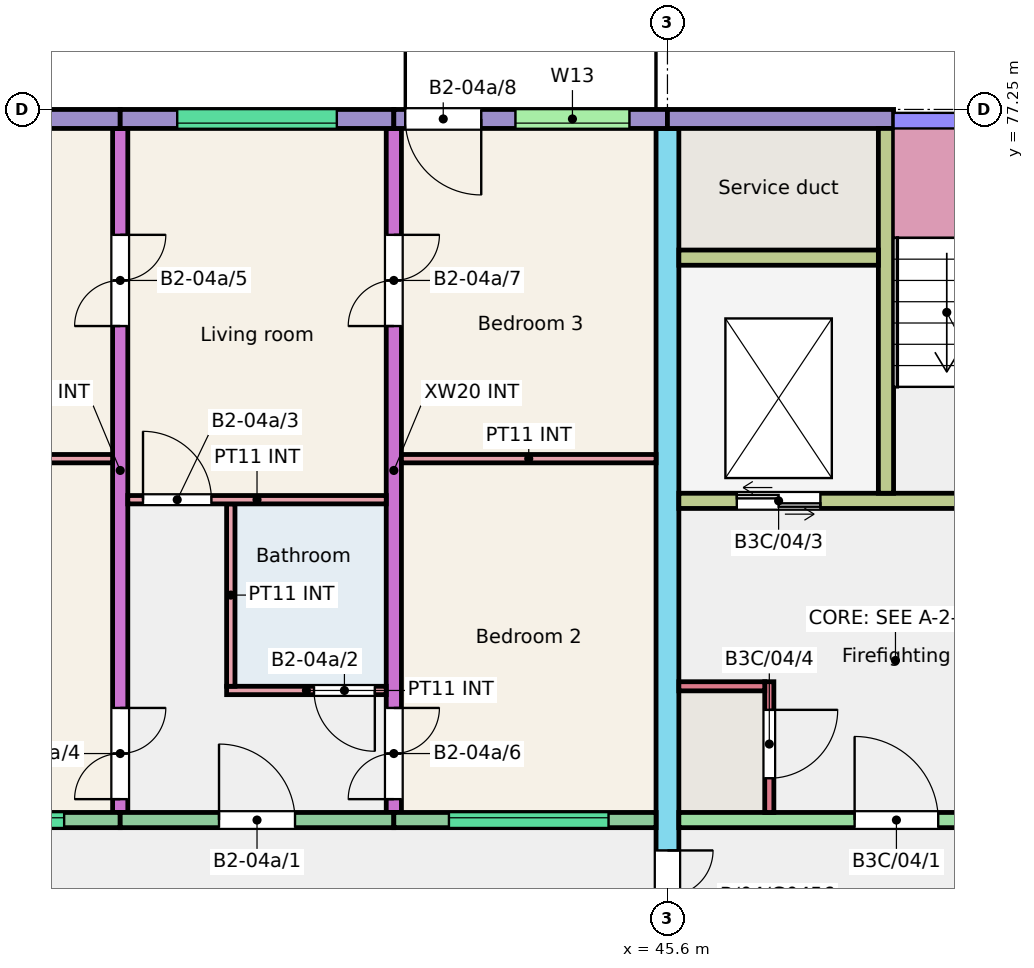
"""IFC4 building model, lengths in metres.
Left out: names, types, materials, properties, quantities, classifications, styles, units other than length and angle.
Written with IfcOpenShell. Run it as: python <this file> out.ifc"""

import sys

from ifc_helpers import new_model, si_unit, direction, frame, frame_2d, origin, place, context, subcontext, project, spatial, rectangle, extrude, element, fill, save


model = new_model("IFC4")
c1 = context("Model", 3, precision=1e-05, world=origin(), true_north=direction((0.0, 1.0)))
c2 = subcontext(c1, "Body", "Model", "MODEL_VIEW")
j1 = project(units=[si_unit("LENGTHUNIT", "METRE"), si_unit("PLANEANGLEUNIT", "RADIAN")], contexts=[c1])
p1 = place(None, origin())
s1 = spatial("IfcSite", under=j1, at=p1, CompositionType="ELEMENT")
p2 = place(p1, origin())
s2 = spatial("IfcBuilding", under=s1, at=p2, CompositionType="ELEMENT")
p3 = place(p2, frame((0.0, 0.0, 12.0)))
s3 = spatial("IfcBuildingStorey", under=s2, at=p3, CompositionType="ELEMENT", Elevation=12.0)
p4 = place(p3, frame((38.4, 68.0, 0.0), z_axis=(0.0, 0.0, 1.0), x_axis=(0.0, 1.0, 0.0)))
e1 = element("IfcWall", 1, at=p4, inside=s3, PredefinedType="SHEAR", context=c2, shape_type="SweptSolid", body=[
    extrude(rectangle(XDim=9.0, YDim=0.2, at=frame_2d((4.5, 0.0))), origin(), (0.0, 0.0, 1.0), 3.0),
])
p5 = place(p4, frame((0.175, 0.0, 0.0)))
e2 = element("IfcOpeningElement", 2, at=p5, cuts=e1, PredefinedType="OPENING", context=c2, shape_type="SweptSolid", body=[
    extrude(rectangle(XDim=1.2, YDim=2.1, at=frame_2d((0.6, 1.05))), frame((0.0, 0.11, 0.0), z_axis=(0.0, -1.0, 0.0), x_axis=(1.0, 0.0, 0.0)), (0.0, 0.0, 1.0), 0.22),
])
p6 = place(p4, frame((6.4, 0.0, 0.0)))
e3 = element("IfcOpeningElement", 3, at=p6, cuts=e1, PredefinedType="OPENING", context=c2, shape_type="SweptSolid", body=[
    extrude(rectangle(XDim=1.2, YDim=2.1, at=frame_2d((0.6, 1.05))), frame((0.0, 0.11, 0.0), z_axis=(0.0, -1.0, 0.0), x_axis=(1.0, 0.0, 0.0)), (0.0, 0.0, 1.0), 0.22),
])
p7 = place(p3, frame((42.0, 68.0, 0.0), z_axis=(0.0, 0.0, 1.0), x_axis=(0.0, 1.0, 0.0)))
e4 = element("IfcWall", 4, at=p7, inside=s3, PredefinedType="SHEAR", context=c2, shape_type="SweptSolid", body=[
    extrude(rectangle(XDim=9.0, YDim=0.2, at=frame_2d((4.5, 0.0))), origin(), (0.0, 0.0, 1.0), 3.0),
])
p8 = place(p7, frame((0.175, 0.0, 0.0)))
e5 = element("IfcOpeningElement", 5, at=p8, cuts=e4, PredefinedType="OPENING", context=c2, shape_type="SweptSolid", body=[
    extrude(rectangle(XDim=1.2, YDim=2.1, at=frame_2d((0.6, 1.05))), frame((0.0, 0.11, 0.0), z_axis=(0.0, -1.0, 0.0), x_axis=(1.0, 0.0, 0.0)), (0.0, 0.0, 1.0), 0.22),
])
p9 = place(p7, frame((6.4, 0.0, 0.0)))
e6 = element("IfcOpeningElement", 6, at=p9, cuts=e4, PredefinedType="OPENING", context=c2, shape_type="SweptSolid", body=[
    extrude(rectangle(XDim=1.2, YDim=2.1, at=frame_2d((0.6, 1.05))), frame((0.0, 0.11, 0.0), z_axis=(0.0, -1.0, 0.0), x_axis=(1.0, 0.0, 0.0)), (0.0, 0.0, 1.0), 0.22),
])
p10 = place(p3, frame((45.6, 66.0, 0.0), z_axis=(0.0, 0.0, 1.0), x_axis=(0.0, 1.0, 0.0)))
e7 = element("IfcWall", 7, at=p10, inside=s3, PredefinedType="SHEAR", context=c2, shape_type="SweptSolid", body=[
    extrude(rectangle(XDim=11.0, YDim=0.3, at=frame_2d((5.5, 0.0))), origin(), (0.0, 0.0, 1.0), 3.0),
])
p11 = place(p10, frame((0.3, 0.0, 0.0)))
e8 = element("IfcOpeningElement", 8, at=p11, cuts=e7, PredefinedType="OPENING", context=c2, shape_type="SweptSolid", body=[
    extrude(rectangle(XDim=1.2, YDim=2.1, at=frame_2d((0.6, 1.05))), frame((0.0, 0.16, 0.0), z_axis=(0.0, -1.0, 0.0), x_axis=(1.0, 0.0, 0.0)), (0.0, 0.0, 1.0), 0.32),
])
p12 = place(p3, frame((34.8, 77.125, 0.0), z_axis=(0.0, 0.0, 1.0), x_axis=(1.0, 0.0, 0.0)))
e9 = element("IfcWall", 9, at=p12, inside=s3, PredefinedType="SOLIDWALL", context=c2, shape_type="SweptSolid", body=[
    extrude(rectangle(XDim=3.6, YDim=0.25, at=frame_2d((1.8, 0.0))), origin(), (0.0, 0.0, 1.0), 3.0),
])
p13 = place(p12, frame((1.212, 0.0, 1.1)))
e10 = element("IfcOpeningElement", 10, at=p13, cuts=e9, PredefinedType="OPENING", context=c2, shape_type="SweptSolid", body=[
    extrude(rectangle(XDim=1.2, YDim=1.3, at=frame_2d((0.6, 0.65))), frame((0.0, 0.135, 0.0), z_axis=(0.0, -1.0, 0.0), x_axis=(1.0, 0.0, 0.0)), (0.0, 0.0, 1.0), 0.27),
])
p14 = place(p3, frame((34.8, 67.9, 0.0), z_axis=(0.0, 0.0, 1.0), x_axis=(1.0, 0.0, 0.0)))
e11 = element("IfcWall", 11, at=p14, inside=s3, PredefinedType="SOLIDWALL", context=c2, shape_type="SweptSolid", body=[
    extrude(rectangle(XDim=3.6, YDim=0.2, at=frame_2d((1.8, 0.0))), origin(), (0.0, 0.0, 1.0), 3.0),
])
p15 = place(p14, frame((0.762, 0.0, 1.2)))
e12 = element("IfcOpeningElement", 12, at=p15, cuts=e11, PredefinedType="OPENING", context=c2, shape_type="SweptSolid", body=[
    extrude(rectangle(XDim=2.1, YDim=1.2, at=frame_2d((1.05, 0.6))), frame((0.0, 0.11, 0.0), z_axis=(0.0, -1.0, 0.0), x_axis=(1.0, 0.0, 0.0)), (0.0, 0.0, 1.0), 0.22),
])
p16 = place(p3, frame((38.4, 77.125, 0.0), z_axis=(0.0, 0.0, 1.0), x_axis=(1.0, 0.0, 0.0)))
e13 = element("IfcWall", 13, at=p16, inside=s3, PredefinedType="SOLIDWALL", context=c2, shape_type="SweptSolid", body=[
    extrude(rectangle(XDim=3.6, YDim=0.25, at=frame_2d((1.8, 0.0))), origin(), (0.0, 0.0, 1.0), 3.0),
])
p17 = place(p16, frame((0.75, 0.0, 1.2)))
e14 = element("IfcOpeningElement", 14, at=p17, cuts=e13, PredefinedType="OPENING", context=c2, shape_type="SweptSolid", body=[
    extrude(rectangle(XDim=2.1, YDim=1.2, at=frame_2d((1.05, 0.6))), frame((0.0, 0.135, 0.0), z_axis=(0.0, -1.0, 0.0), x_axis=(1.0, 0.0, 0.0)), (0.0, 0.0, 1.0), 0.27),
])
p18 = place(p3, frame((38.4, 67.9, 0.0), z_axis=(0.0, 0.0, 1.0), x_axis=(1.0, 0.0, 0.0)))
e15 = element("IfcWall", 15, at=p18, inside=s3, PredefinedType="SOLIDWALL", context=c2, shape_type="SweptSolid", body=[
    extrude(rectangle(XDim=3.6, YDim=0.2, at=frame_2d((1.8, 0.0))), origin(), (0.0, 0.0, 1.0), 3.0),
])
p19 = place(p18, frame((1.3, 0.0, 0.0)))
e16 = element("IfcOpeningElement", 16, at=p19, cuts=e15, PredefinedType="OPENING", context=c2, shape_type="SweptSolid", body=[
    extrude(rectangle(XDim=1.0, YDim=2.1, at=frame_2d((0.5, 1.05))), frame((0.0, 0.11, 0.0), z_axis=(0.0, -1.0, 0.0), x_axis=(1.0, 0.0, 0.0)), (0.0, 0.0, 1.0), 0.22),
])
p20 = place(p3, frame((42.0, 77.125, 0.0), z_axis=(0.0, 0.0, 1.0), x_axis=(1.0, 0.0, 0.0)))
e17 = element("IfcWall", 17, at=p20, inside=s3, PredefinedType="SOLIDWALL", context=c2, shape_type="SweptSolid", body=[
    extrude(rectangle(XDim=3.6, YDim=0.25, at=frame_2d((1.8, 0.0))), origin(), (0.0, 0.0, 1.0), 3.0),
])
p21 = place(p20, frame((1.6, 0.0, 1.2)))
e18 = element("IfcOpeningElement", 18, at=p21, cuts=e17, PredefinedType="OPENING", context=c2, shape_type="SweptSolid", body=[
    extrude(rectangle(XDim=1.5, YDim=1.2, at=frame_2d((0.75, 0.6))), frame((0.0, 0.135, 0.0), z_axis=(0.0, -1.0, 0.0), x_axis=(1.0, 0.0, 0.0)), (0.0, 0.0, 1.0), 0.27),
])
p22 = place(p20, frame((0.15, 0.0, 0.0)))
e19 = element("IfcOpeningElement", 19, at=p22, cuts=e17, PredefinedType="OPENING", context=c2, shape_type="SweptSolid", body=[
    extrude(rectangle(XDim=1.0, YDim=2.1, at=frame_2d((0.5, 1.05))), frame((0.0, 0.135, 0.0), z_axis=(0.0, -1.0, 0.0), x_axis=(1.0, 0.0, 0.0)), (0.0, 0.0, 1.0), 0.27),
])
p23 = place(p3, frame((42.0, 67.9, 0.0), z_axis=(0.0, 0.0, 1.0), x_axis=(1.0, 0.0, 0.0)))
e20 = element("IfcWall", 20, at=p23, inside=s3, PredefinedType="SOLIDWALL", context=c2, shape_type="SweptSolid", body=[
    extrude(rectangle(XDim=3.45, YDim=0.2, at=frame_2d((1.725, 0.0))), origin(), (0.0, 0.0, 1.0), 3.0),
])
p24 = place(p23, frame((0.725, 0.0, 1.2)))
e21 = element("IfcOpeningElement", 21, at=p24, cuts=e20, PredefinedType="OPENING", context=c2, shape_type="SweptSolid", body=[
    extrude(rectangle(XDim=2.1, YDim=1.2, at=frame_2d((1.05, 0.6))), frame((0.0, 0.11, 0.0), z_axis=(0.0, -1.0, 0.0), x_axis=(1.0, 0.0, 0.0)), (0.0, 0.0, 1.0), 0.22),
])
p25 = place(p3, frame((45.6, 77.125, 0.0), z_axis=(0.0, 0.0, 1.0), x_axis=(1.0, 0.0, 0.0)))
e22 = element("IfcWall", 22, at=p25, inside=s3, PredefinedType="SOLIDWALL", context=c2, shape_type="SweptSolid", body=[
    extrude(rectangle(XDim=2.975, YDim=0.25, at=frame_2d((1.487, 0.0))), origin(), (0.0, 0.0, 1.0), 3.0),
])
p26 = place(p3, frame((45.75, 67.9, 0.0), z_axis=(0.0, 0.0, 1.0), x_axis=(1.0, 0.0, 0.0)))
e23 = element("IfcWall", 23, at=p26, inside=s3, PredefinedType="SHEAR", context=c2, shape_type="SweptSolid", body=[
    extrude(rectangle(XDim=5.85, YDim=0.2, at=frame_2d((2.925, 0.0))), origin(), (0.0, 0.0, 1.0), 3.0),
])
p27 = place(p26, frame((2.312, 0.0, 0.0)))
e24 = element("IfcOpeningElement", 24, at=p27, cuts=e23, PredefinedType="OPENING", context=c2, shape_type="SweptSolid", body=[
    extrude(rectangle(XDim=1.1, YDim=2.1, at=frame_2d((0.55, 1.05))), frame((0.0, 0.11, 0.0), z_axis=(0.0, -1.0, 0.0), x_axis=(1.0, 0.0, 0.0)), (0.0, 0.0, 1.0), 0.22),
])
p28 = place(p3, frame((45.75, 72.1, 0.0), z_axis=(0.0, 0.0, 1.0), x_axis=(1.0, 0.0, 0.0)))
e25 = element("IfcWall", 25, at=p28, inside=s3, PredefinedType="SHEAR", context=c2, shape_type="SweptSolid", body=[
    extrude(rectangle(XDim=5.725, YDim=0.2, at=frame_2d((2.863, 0.0))), origin(), (0.0, 0.0, 1.0), 3.0),
])
p29 = place(p28, frame((3.775, 0.0, 0.0)))
e26 = element("IfcOpeningElement", 26, at=p29, cuts=e25, PredefinedType="OPENING", context=c2, shape_type="SweptSolid", body=[
    extrude(rectangle(XDim=1.0, YDim=2.1, at=frame_2d((0.5, 1.05))), frame((0.0, 0.11, 0.0), z_axis=(0.0, -1.0, 0.0), x_axis=(1.0, 0.0, 0.0)), (0.0, 0.0, 1.0), 0.22),
])
p30 = place(p28, frame((0.762, 0.0, 0.0)))
e27 = element("IfcOpeningElement", 27, at=p30, cuts=e25, PredefinedType="OPENING", context=c2, shape_type="SweptSolid", body=[
    extrude(rectangle(XDim=1.1, YDim=2.1, at=frame_2d((0.55, 1.05))), frame((0.0, 0.11, 0.0), z_axis=(0.0, -1.0, 0.0), x_axis=(1.0, 0.0, 0.0)), (0.0, 0.0, 1.0), 0.22),
])
p31 = place(p3, frame((48.475, 72.2, 0.0), z_axis=(0.0, 0.0, 1.0), x_axis=(0.0, 1.0, 0.0)))
e28 = element("IfcWall", 28, at=p31, inside=s3, PredefinedType="SHEAR", context=c2, shape_type="SweptSolid", body=[
    extrude(rectangle(XDim=4.8, YDim=0.2, at=frame_2d((2.4, 0.0))), origin(), (0.0, 0.0, 1.0), 3.0),
])
p32 = place(p3, frame((45.75, 75.3, 0.0), z_axis=(0.0, 0.0, 1.0), x_axis=(1.0, 0.0, 0.0)))
e29 = element("IfcWall", 29, at=p32, inside=s3, PredefinedType="SHEAR", context=c2, shape_type="SweptSolid", body=[
    extrude(rectangle(XDim=2.625, YDim=0.2, at=frame_2d((1.312, 0.0))), origin(), (0.0, 0.0, 1.0), 3.0),
])
p33 = place(p3, frame((46.94, 68.0, 0.0), z_axis=(0.0, 0.0, 1.0), x_axis=(0.0, 1.0, 0.0)))
e30 = element("IfcWall", 30, at=p33, inside=s3, PredefinedType="SHEAR", context=c2, shape_type="SweptSolid", body=[
    extrude(rectangle(XDim=1.72, YDim=0.12, at=frame_2d((0.86, 0.0))), origin(), (0.0, 0.0, 1.0), 3.0),
])
p34 = place(p33, frame((0.45, 0.0, 0.0)))
e31 = element("IfcOpeningElement", 31, at=p34, cuts=e30, PredefinedType="OPENING", context=c2, shape_type="SweptSolid", body=[
    extrude(rectangle(XDim=0.9, YDim=2.1, at=frame_2d((0.45, 1.05))), frame((0.0, 0.07, 0.0), z_axis=(0.0, -1.0, 0.0), x_axis=(1.0, 0.0, 0.0)), (0.0, 0.0, 1.0), 0.14),
])
p35 = place(p3, frame((45.75, 69.66, 0.0), z_axis=(0.0, 0.0, 1.0), x_axis=(1.0, 0.0, 0.0)))
e32 = element("IfcWall", 32, at=p35, inside=s3, PredefinedType="SHEAR", context=c2, shape_type="SweptSolid", body=[
    extrude(rectangle(XDim=1.13, YDim=0.12, at=frame_2d((0.565, 0.0))), origin(), (0.0, 0.0, 1.0), 3.0),
])
p36 = place(p3, frame((39.8, 69.605, 0.0), z_axis=(0.0, 0.0, 1.0), x_axis=(1.0, 0.0, 0.0)))
e33 = element("IfcWall", 33, at=p36, inside=s3, PredefinedType="PARTITIONING", context=c2, shape_type="SweptSolid", body=[
    extrude(rectangle(XDim=2.1, YDim=0.11, at=frame_2d((1.05, 0.0))), origin(), (0.0, 0.0, 1.0), 2.8),
])
p37 = place(p36, frame((1.15, 0.0, 0.0)))
e34 = element("IfcOpeningElement", 34, at=p37, cuts=e33, PredefinedType="OPENING", context=c2, shape_type="SweptSolid", body=[
    extrude(rectangle(XDim=0.8, YDim=2.1, at=frame_2d((0.4, 1.05))), frame((0.0, 0.065, 0.0), z_axis=(0.0, -1.0, 0.0), x_axis=(1.0, 0.0, 0.0)), (0.0, 0.0, 1.0), 0.13),
])
p38 = place(p3, frame((39.855, 69.66, 0.0), z_axis=(0.0, 0.0, 1.0), x_axis=(0.0, 1.0, 0.0)))
e35 = element("IfcWall", 35, at=p38, inside=s3, PredefinedType="PARTITIONING", context=c2, shape_type="SweptSolid", body=[
    extrude(rectangle(XDim=2.4, YDim=0.11, at=frame_2d((1.2, 0.0))), origin(), (0.0, 0.0, 1.0), 2.8),
])
p39 = place(p3, frame((38.5, 72.115, 0.0), z_axis=(0.0, 0.0, 1.0), x_axis=(1.0, 0.0, 0.0)))
e36 = element("IfcWall", 36, at=p39, inside=s3, PredefinedType="PARTITIONING", context=c2, shape_type="SweptSolid", body=[
    extrude(rectangle(XDim=3.4, YDim=0.11, at=frame_2d((1.7, 0.0))), origin(), (0.0, 0.0, 1.0), 2.8),
])
p40 = place(p39, frame((0.2, 0.0, 0.0)))
e37 = element("IfcOpeningElement", 37, at=p40, cuts=e36, PredefinedType="OPENING", context=c2, shape_type="SweptSolid", body=[
    extrude(rectangle(XDim=0.9, YDim=2.1, at=frame_2d((0.45, 1.05))), frame((0.0, 0.065, 0.0), z_axis=(0.0, -1.0, 0.0), x_axis=(1.0, 0.0, 0.0)), (0.0, 0.0, 1.0), 0.13),
])
p41 = place(p3, frame((34.925, 72.655, 0.0), z_axis=(0.0, 0.0, 1.0), x_axis=(1.0, 0.0, 0.0)))
e38 = element("IfcWall", 38, at=p41, inside=s3, PredefinedType="PARTITIONING", context=c2, shape_type="SweptSolid", body=[
    extrude(rectangle(XDim=3.375, YDim=0.11, at=frame_2d((1.688, 0.0))), origin(), (0.0, 0.0, 1.0), 2.8),
])
p42 = place(p3, frame((42.1, 72.655, 0.0), z_axis=(0.0, 0.0, 1.0), x_axis=(1.0, 0.0, 0.0)))
e39 = element("IfcWall", 39, at=p42, inside=s3, PredefinedType="PARTITIONING", context=c2, shape_type="SweptSolid", body=[
    extrude(rectangle(XDim=3.35, YDim=0.11, at=frame_2d((1.675, 0.0))), origin(), (0.0, 0.0, 1.0), 2.8),
])
p43 = place(p15, origin())
e40 = element("IfcWindow", 40, at=p43, inside=s3, PartitioningType="SINGLE_PANEL", PredefinedType="WINDOW", context=c2, shape_type="SweptSolid", body=[
    extrude(rectangle(XDim=2.1, YDim=1.2, at=frame_2d((1.05, 0.6))), frame((0.0, 0.06, 0.0), z_axis=(0.0, -1.0, 0.0), x_axis=(1.0, 0.0, 0.0)), (0.0, 0.0, 1.0), 0.06),
])
fill(e12, e40)
p44 = place(p24, origin())
e41 = element("IfcWindow", 41, at=p44, inside=s3, PartitioningType="SINGLE_PANEL", PredefinedType="WINDOW", context=c2, shape_type="SweptSolid", body=[
    extrude(rectangle(XDim=2.1, YDim=1.2, at=frame_2d((1.05, 0.6))), frame((0.0, 0.06, 0.0), z_axis=(0.0, -1.0, 0.0), x_axis=(1.0, 0.0, 0.0)), (0.0, 0.0, 1.0), 0.06),
])
fill(e21, e41)
p45 = place(p21, origin())
e42 = element("IfcWindow", 42, at=p45, inside=s3, PartitioningType="SINGLE_PANEL", PredefinedType="WINDOW", context=c2, shape_type="SweptSolid", body=[
    extrude(rectangle(XDim=1.5, YDim=1.2, at=frame_2d((0.75, 0.6))), frame((0.0, -0.025, 0.0), z_axis=(0.0, -1.0, 0.0), x_axis=(1.0, 0.0, 0.0)), (0.0, 0.0, 1.0), 0.06),
])
fill(e18, e42)
p46 = place(p17, origin())
e43 = element("IfcWindow", 43, at=p46, inside=s3, PartitioningType="SINGLE_PANEL", PredefinedType="WINDOW", context=c2, shape_type="SweptSolid", body=[
    extrude(rectangle(XDim=2.1, YDim=1.2, at=frame_2d((1.05, 0.6))), frame((0.0, -0.025, 0.0), z_axis=(0.0, -1.0, 0.0), x_axis=(1.0, 0.0, 0.0)), (0.0, 0.0, 1.0), 0.06),
])
fill(e14, e43)
p47 = place(p19, origin())
e44 = element("IfcDoor", 44, at=p47, inside=s3, OperationType="SINGLE_SWING_LEFT", PredefinedType="DOOR", context=c2, shape_type="SweptSolid", body=[
    extrude(rectangle(XDim=1.0, YDim=2.1, at=frame_2d((0.5, 1.05))), frame((0.0, 0.025, 0.0), z_axis=(0.0, -1.0, 0.0), x_axis=(1.0, 0.0, 0.0)), (0.0, 0.0, 1.0), 0.05),
])
fill(e16, e44)
p48 = place(p37, origin())
e45 = element("IfcDoor", 45, at=p48, inside=s3, OperationType="SINGLE_SWING_RIGHT", PredefinedType="DOOR", context=c2, shape_type="SweptSolid", body=[
    extrude(rectangle(XDim=0.8, YDim=2.1, at=frame_2d((0.4, 1.05))), frame((0.0, 0.025, 0.0), z_axis=(0.0, -1.0, 0.0), x_axis=(1.0, 0.0, 0.0)), (0.0, 0.0, 1.0), 0.05),
])
fill(e34, e45)
p49 = place(p40, origin())
e46 = element("IfcDoor", 46, at=p49, inside=s3, OperationType="SINGLE_SWING_LEFT", PredefinedType="DOOR", context=c2, shape_type="SweptSolid", body=[
    extrude(rectangle(XDim=0.9, YDim=2.1, at=frame_2d((0.45, 1.05))), frame((0.0, 0.025, 0.0), z_axis=(0.0, -1.0, 0.0), x_axis=(1.0, 0.0, 0.0)), (0.0, 0.0, 1.0), 0.05),
])
fill(e37, e46)
p50 = place(p5, origin())
e47 = element("IfcDoor", 47, at=p50, inside=s3, OperationType="DOUBLE_DOOR_SINGLE_SWING", PredefinedType="DOOR", context=c2, shape_type="SweptSolid", body=[
    extrude(rectangle(XDim=1.2, YDim=2.1, at=frame_2d((0.6, 1.05))), frame((0.0, 0.025, 0.0), z_axis=(0.0, -1.0, 0.0), x_axis=(1.0, 0.0, 0.0)), (0.0, 0.0, 1.0), 0.05),
])
fill(e2, e47)
p51 = place(p6, origin())
e48 = element("IfcDoor", 48, at=p51, inside=s3, OperationType="DOUBLE_DOOR_SINGLE_SWING", PredefinedType="DOOR", context=c2, shape_type="SweptSolid", body=[
    extrude(rectangle(XDim=1.2, YDim=2.1, at=frame_2d((0.6, 1.05))), frame((0.0, 0.025, 0.0), z_axis=(0.0, -1.0, 0.0), x_axis=(1.0, 0.0, 0.0)), (0.0, 0.0, 1.0), 0.05),
])
fill(e3, e48)
p52 = place(p8, origin())
e49 = element("IfcDoor", 49, at=p52, inside=s3, OperationType="DOUBLE_DOOR_SINGLE_SWING", PredefinedType="DOOR", context=c2, shape_type="SweptSolid", body=[
    extrude(rectangle(XDim=1.2, YDim=2.1, at=frame_2d((0.6, 1.05))), frame((0.0, 0.025, 0.0), z_axis=(0.0, -1.0, 0.0), x_axis=(1.0, 0.0, 0.0)), (0.0, 0.0, 1.0), 0.05),
])
fill(e5, e49)
p53 = place(p9, origin())
e50 = element("IfcDoor", 50, at=p53, inside=s3, OperationType="DOUBLE_DOOR_SINGLE_SWING", PredefinedType="DOOR", context=c2, shape_type="SweptSolid", body=[
    extrude(rectangle(XDim=1.2, YDim=2.1, at=frame_2d((0.6, 1.05))), frame((0.0, 0.025, 0.0), z_axis=(0.0, -1.0, 0.0), x_axis=(1.0, 0.0, 0.0)), (0.0, 0.0, 1.0), 0.05),
])
fill(e6, e50)
p54 = place(p22, origin())
e51 = element("IfcDoor", 51, at=p54, inside=s3, OperationType="SINGLE_SWING_RIGHT", PredefinedType="DOOR", context=c2, shape_type="SweptSolid", body=[
    extrude(rectangle(XDim=1.0, YDim=2.1, at=frame_2d((0.5, 1.05))), frame((0.0, 0.025, 0.0), z_axis=(0.0, -1.0, 0.0), x_axis=(1.0, 0.0, 0.0)), (0.0, 0.0, 1.0), 0.05),
])
fill(e19, e51)
p55 = place(p27, origin())
e52 = element("IfcDoor", 52, at=p55, inside=s3, OperationType="SINGLE_SWING_LEFT", PredefinedType="DOOR", context=c2, shape_type="SweptSolid", body=[
    extrude(rectangle(XDim=1.1, YDim=2.1, at=frame_2d((0.55, 1.05))), frame((0.0, 0.025, 0.0), z_axis=(0.0, -1.0, 0.0), x_axis=(1.0, 0.0, 0.0)), (0.0, 0.0, 1.0), 0.05),
])
fill(e24, e52)
p56 = place(p30, origin())
e53 = element("IfcDoor", 53, at=p56, inside=s3, OperationType="DOUBLE_DOOR_SLIDING", PredefinedType="DOOR", context=c2, shape_type="SweptSolid", body=[
    extrude(rectangle(XDim=1.1, YDim=2.1, at=frame_2d((0.55, 1.05))), frame((0.0, 0.025, 0.0), z_axis=(0.0, -1.0, 0.0), x_axis=(1.0, 0.0, 0.0)), (0.0, 0.0, 1.0), 0.05),
])
fill(e27, e53)
p57 = place(p34, origin())
e54 = element("IfcDoor", 54, at=p57, inside=s3, OperationType="SINGLE_SWING_RIGHT", PredefinedType="DOOR", context=c2, shape_type="SweptSolid", body=[
    extrude(rectangle(XDim=0.9, YDim=2.1, at=frame_2d((0.45, 1.05))), frame((0.0, 0.025, 0.0), z_axis=(0.0, -1.0, 0.0), x_axis=(1.0, 0.0, 0.0)), (0.0, 0.0, 1.0), 0.05),
])
fill(e31, e54)
p58 = place(p11, origin())
e55 = element("IfcDoor", 55, at=p58, inside=s3, OperationType="DOUBLE_DOOR_SINGLE_SWING", PredefinedType="DOOR", context=c2, shape_type="SweptSolid", body=[
    extrude(rectangle(XDim=1.2, YDim=2.1, at=frame_2d((0.6, 1.05))), frame((0.0, 0.025, 0.0), z_axis=(0.0, -1.0, 0.0), x_axis=(1.0, 0.0, 0.0)), (0.0, 0.0, 1.0), 0.05),
])
fill(e8, e55)
save(model, sys.argv[1])
